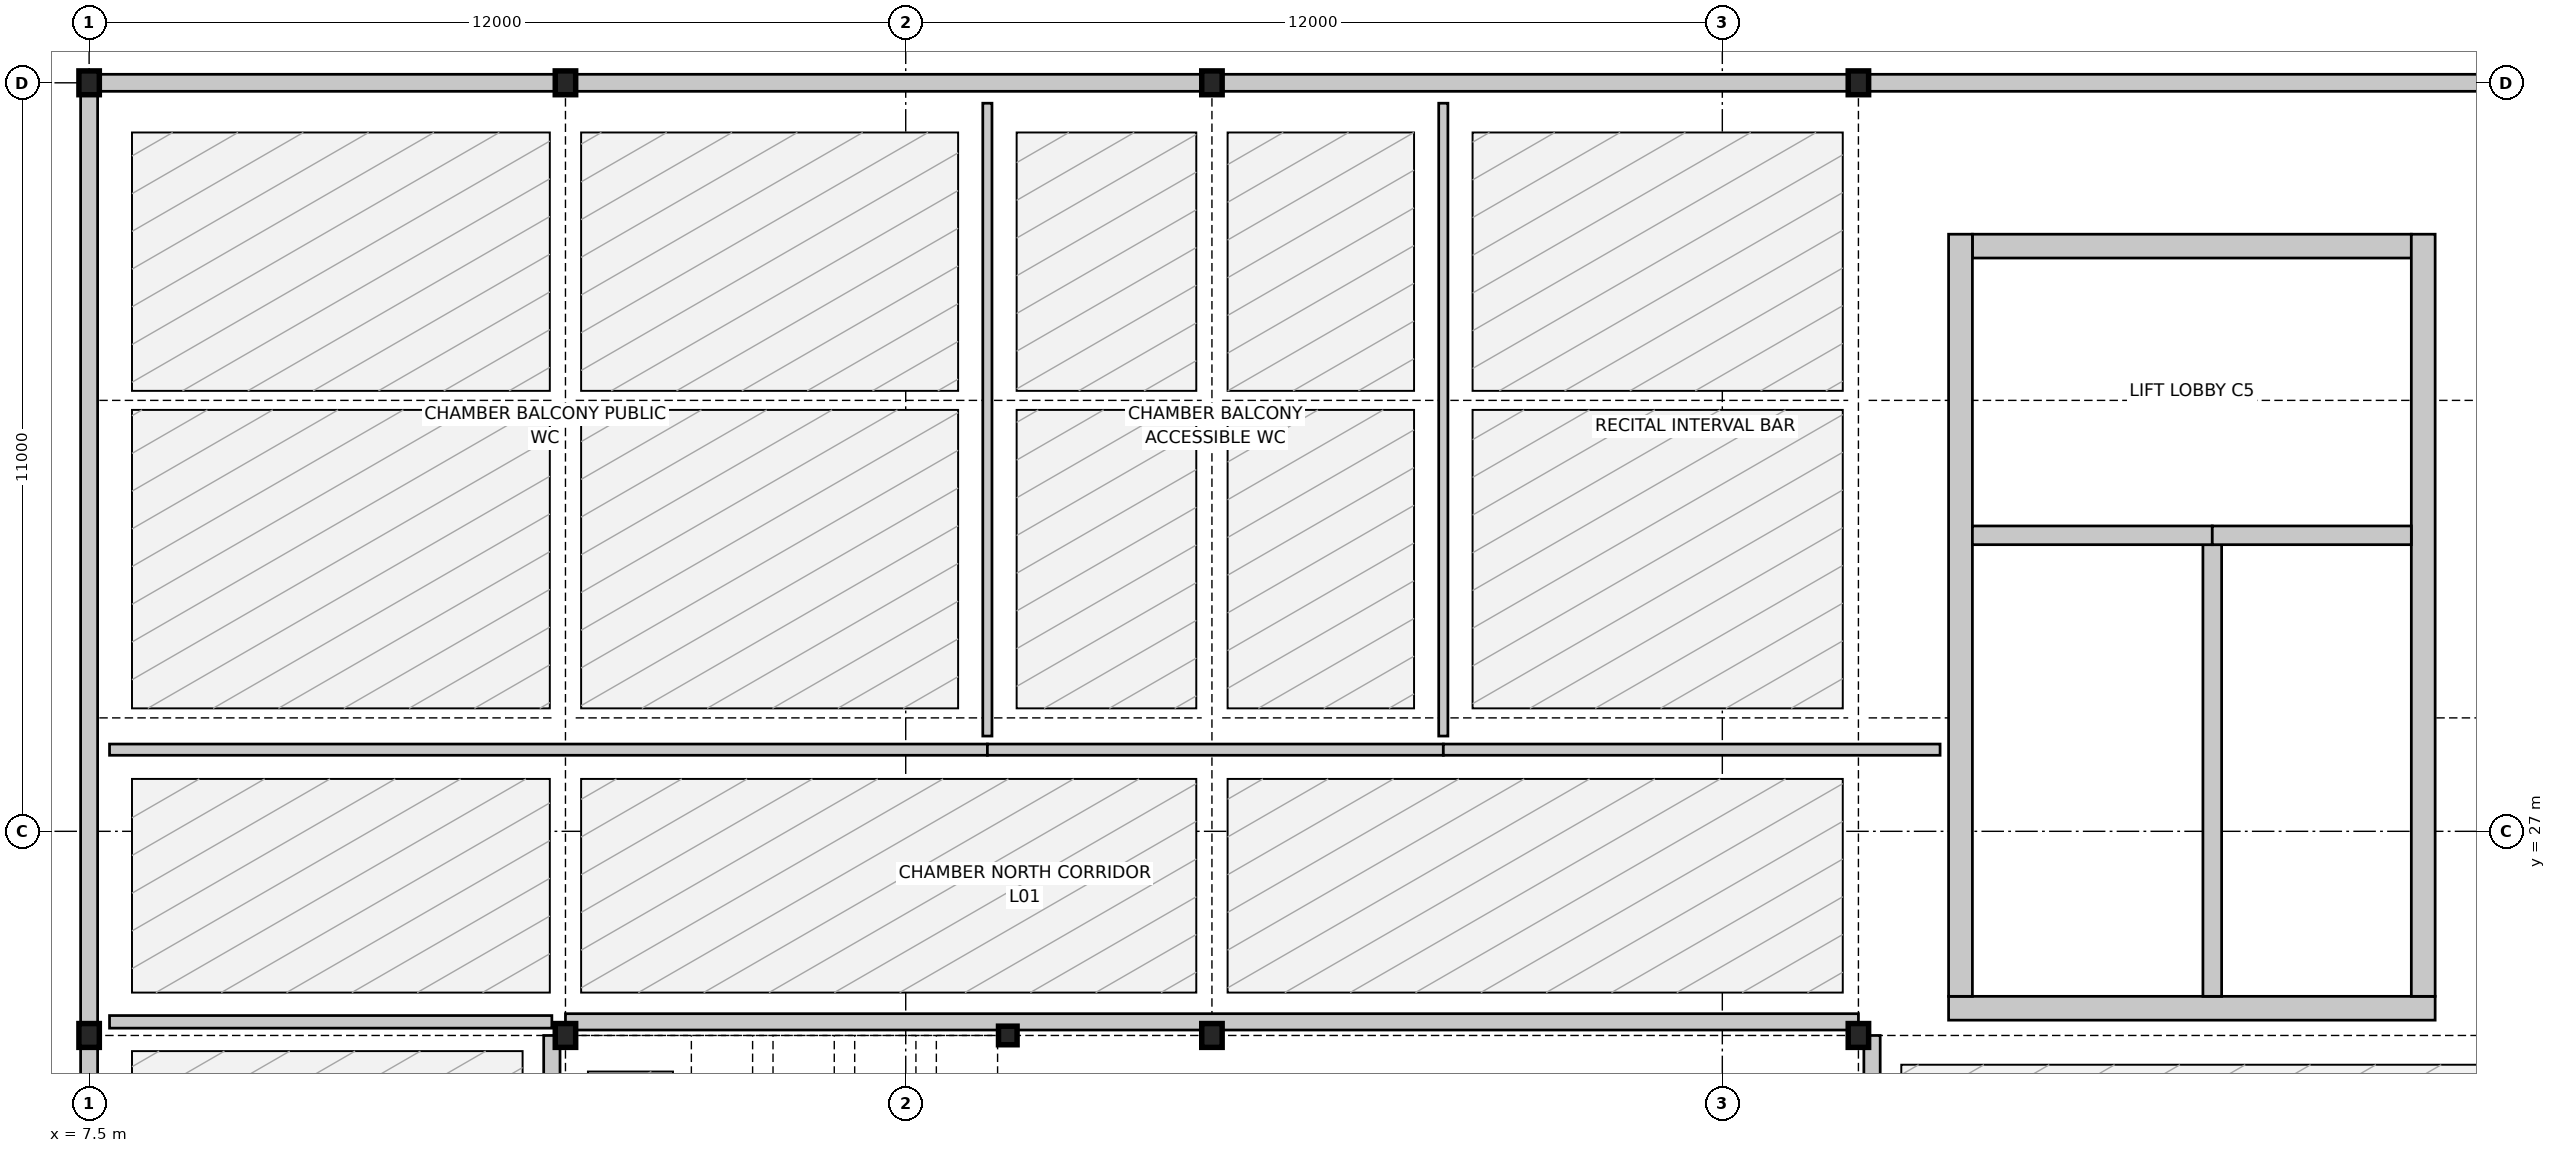
"""IFC4 building model, lengths in metres.
Left out: names, types, materials, properties, quantities, classifications, styles, units other than length and angle.
Written with IfcOpenShell. Run it as: python <this file> out.ifc"""

import sys

from ifc_helpers import new_model, si_unit, direction, frame, frame_2d, origin, origin_2d, place, context, subcontext, project, spatial, rectangle, hollow_circle, i_section, extrude, element, fill, save


model = new_model("IFC4")
c1 = context("Model", 3, precision=1e-05, world=origin(), true_north=direction((0.0, 1.0)))
c2 = subcontext(c1, "Body", "Model", "MODEL_VIEW")
j1 = project(units=[si_unit("LENGTHUNIT", "METRE"), si_unit("PLANEANGLEUNIT", "RADIAN")], contexts=[c1])
p1 = place(None, origin())
s1 = spatial("IfcSite", under=j1, at=p1, CompositionType="ELEMENT")
p2 = place(p1, origin())
s2 = spatial("IfcBuilding", under=s1, at=p2, CompositionType="ELEMENT")
p3 = place(p2, frame((0.0, 0.0, 4.8)))
s3 = spatial("IfcBuildingStorey", under=s2, at=p3, CompositionType="ELEMENT", Elevation=4.8)
for number, where, z_axis, x_axis in (
    (1, (33.5, 38.0, 0.0), (0.0, 0.0, 1.0), (1.0, 0.0, 0.0)),
    (2, (24.0, 38.0, 0.0), (0.0, 0.0, 1.0), (1.0, 0.0, 0.0)),
    (3, (14.5, 38.0, 0.0), (0.0, 0.0, 1.0), (1.0, 0.0, 0.0)),
    (4, (7.5, 38.0, 0.0), (0.0, 0.0, 1.0), (1.0, 0.0, 0.0)),
    (5, (7.5, 24.0, 0.0), (0.0, 0.0, 1.0), (1.0, 0.0, 0.0)),
    (6, (14.5, 24.0, 0.0), (0.0, 0.0, 1.0), (1.0, 0.0, 0.0)),
    (7, (24.0, 24.0, 0.0), (0.0, 0.0, 1.0), (1.0, 0.0, 0.0)),
    (8, (33.5, 24.0, 0.0), (0.0, 0.0, 1.0), (1.0, 0.0, 0.0)),
):
    element("IfcColumn", number, at=place(p3, frame(where, z_axis=z_axis, x_axis=x_axis)), inside=s3, PredefinedType="COLUMN", context=c2, shape_type="SweptSolid", body=[
        extrude(i_section(OverallWidth=0.3, OverallDepth=0.35, WebThickness=0.01, FlangeThickness=0.018, FilletRadius=0.027, at=origin_2d()), origin(), (0.0, 0.0, 1.0), 4.8),
    ])
p4 = place(p3, frame((21.0, 24.0, 0.0), z_axis=(0.0, 0.0, 1.0), x_axis=(1.0, 0.0, 0.0)))
e9 = element("IfcColumn", 9, at=p4, inside=s3, PredefinedType="COLUMN", context=c2, shape_type="SweptSolid", body=[
    extrude(hollow_circle(Radius=0.136, WallThickness=0.016, at=origin_2d()), origin(), (0.0, 0.0, 1.0), 0.96),
])
p5 = place(p3, frame((33.52, 38.0, 0.0), z_axis=(0.0, 0.0, 1.0), x_axis=(1.0, 0.0, 0.0)))
e10 = element("IfcWall", 10, at=p5, inside=s3, PredefinedType="SOLIDWALL", context=c2, shape_type="SweptSolid", body=[
    extrude(rectangle(XDim=10.96, YDim=0.25, at=frame_2d((5.48, 0.0))), origin(), (0.0, 0.0, 1.0), 4.078),
])
p6 = place(p3, frame((24.02, 38.0, 0.0), z_axis=(0.0, 0.0, 1.0), x_axis=(1.0, 0.0, 0.0)))
e11 = element("IfcWall", 11, at=p6, inside=s3, PredefinedType="SOLIDWALL", context=c2, shape_type="SweptSolid", body=[
    extrude(rectangle(XDim=9.46, YDim=0.25, at=frame_2d((4.73, 0.0))), origin(), (0.0, 0.0, 1.0), 4.078),
])
p7 = place(p3, frame((14.52, 38.0, 0.0), z_axis=(0.0, 0.0, 1.0), x_axis=(1.0, 0.0, 0.0)))
e12 = element("IfcWall", 12, at=p7, inside=s3, PredefinedType="SOLIDWALL", context=c2, shape_type="SweptSolid", body=[
    extrude(rectangle(XDim=9.46, YDim=0.25, at=frame_2d((4.73, 0.0))), origin(), (0.0, 0.0, 1.0), 4.078),
])
p8 = place(p7, frame((3.38, 0.0, 0.85)))
e13 = element("IfcOpeningElement", 13, at=p8, cuts=e12, PredefinedType="OPENING", context=c2, shape_type="SweptSolid", body=[
    extrude(rectangle(XDim=2.7, YDim=1.7, at=frame_2d((1.35, 0.85))), frame((0.0, 0.135, 0.0), z_axis=(0.0, -1.0, 0.0), x_axis=(1.0, 0.0, 0.0)), (0.0, 0.0, 1.0), 0.27),
])
p9 = place(p3, frame((7.52, 38.0, 0.0), z_axis=(0.0, 0.0, 1.0), x_axis=(1.0, 0.0, 0.0)))
e14 = element("IfcWall", 14, at=p9, inside=s3, PredefinedType="SOLIDWALL", context=c2, shape_type="SweptSolid", body=[
    extrude(rectangle(XDim=6.96, YDim=0.25, at=frame_2d((3.48, 0.0))), origin(), (0.0, 0.0, 1.0), 4.078),
])
p10 = place(p3, frame((7.5, 24.02, 0.0), z_axis=(0.0, 0.0, 1.0), x_axis=(0.0, 1.0, 0.0)))
e15 = element("IfcWall", 15, at=p10, inside=s3, PredefinedType="SOLIDWALL", context=c2, shape_type="SweptSolid", body=[
    extrude(rectangle(XDim=13.96, YDim=0.25, at=frame_2d((6.98, 0.0))), origin(), (0.0, 0.0, 1.0), 4.078),
])
p11 = place(p3, frame((7.5, 11.52, 0.0), z_axis=(0.0, 0.0, 1.0), x_axis=(0.0, 1.0, 0.0)))
e16 = element("IfcWall", 16, at=p11, inside=s3, PredefinedType="SOLIDWALL", context=c2, shape_type="SweptSolid", body=[
    extrude(rectangle(XDim=12.46, YDim=0.25, at=frame_2d((6.23, 0.0))), origin(), (0.0, 0.0, 1.0), 4.078),
])
p12 = place(p11, frame((4.88, 0.0, 0.85)))
e17 = element("IfcOpeningElement", 17, at=p12, cuts=e16, PredefinedType="OPENING", context=c2, shape_type="SweptSolid", body=[
    extrude(rectangle(XDim=2.7, YDim=1.7, at=frame_2d((1.35, 0.85))), frame((0.0, 0.135, 0.0), z_axis=(0.0, -1.0, 0.0), x_axis=(1.0, 0.0, 0.0)), (0.0, 0.0, 1.0), 0.27),
])
p13 = place(p3, frame((34.825, 24.4, 0.0), z_axis=(0.0, 0.0, 1.0), x_axis=(1.0, 0.0, 0.0)))
e18 = element("IfcWall", 18, at=p13, inside=s3, PredefinedType="SHEAR", context=c2, shape_type="SweptSolid", body=[
    extrude(rectangle(XDim=7.15, YDim=0.35, at=frame_2d((3.575, 0.0))), origin(), (0.0, 0.0, 1.0), 4.54),
])
p14 = place(p3, frame((35.175, 35.6, 0.0), z_axis=(0.0, 0.0, 1.0), x_axis=(1.0, 0.0, 0.0)))
e19 = element("IfcWall", 19, at=p14, inside=s3, PredefinedType="SHEAR", context=c2, shape_type="SweptSolid", body=[
    extrude(rectangle(XDim=6.45, YDim=0.35, at=frame_2d((3.225, 0.0))), origin(), (0.0, 0.0, 1.0), 4.54),
])
p15 = place(p14, frame((2.5, 0.0, 0.0)))
e20 = element("IfcOpeningElement", 20, at=p15, cuts=e19, PredefinedType="OPENING", context=c2, shape_type="SweptSolid", body=[
    extrude(rectangle(XDim=1.45, YDim=2.2, at=frame_2d((0.725, 1.1))), frame((0.0, 0.185, 0.0), z_axis=(0.0, -1.0, 0.0), x_axis=(1.0, 0.0, 0.0)), (0.0, 0.0, 1.0), 0.37),
])
for number, where, z_axis, x_axis in (
    (21, (35.0, 24.575, 0.0), (0.0, 0.0, 1.0), (0.0, 1.0, 0.0)),
    (22, (41.8, 24.575, 0.0), (0.0, 0.0, 1.0), (0.0, 1.0, 0.0)),
):
    element("IfcWall", number, at=place(p3, frame(where, z_axis=z_axis, x_axis=x_axis)), inside=s3, PredefinedType="SHEAR", context=c2, shape_type="SweptSolid", body=[
        extrude(rectangle(XDim=11.2, YDim=0.35, at=frame_2d((5.6, 0.0))), origin(), (0.0, 0.0, 1.0), 4.54),
    ])
p16 = place(p3, frame((38.7, 24.575, 0.0), z_axis=(0.0, 0.0, 1.0), x_axis=(0.0, 1.0, 0.0)))
e23 = element("IfcWall", 23, at=p16, inside=s3, PredefinedType="SHEAR", context=c2, shape_type="SweptSolid", body=[
    extrude(rectangle(XDim=6.637, YDim=0.275, at=frame_2d((3.319, 0.0))), origin(), (0.0, 0.0, 1.0), 4.54),
])
p17 = place(p3, frame((35.175, 31.35, 0.0), z_axis=(0.0, 0.0, 1.0), x_axis=(1.0, 0.0, 0.0)))
e24 = element("IfcWall", 24, at=p17, inside=s3, PredefinedType="SHEAR", context=c2, shape_type="SweptSolid", body=[
    extrude(rectangle(XDim=3.525, YDim=0.275, at=frame_2d((1.762, 0.0))), origin(), (0.0, 0.0, 1.0), 4.54),
])
p18 = place(p17, frame((1.835, 0.0, 0.0)))
e25 = element("IfcOpeningElement", 25, at=p18, cuts=e24, PredefinedType="OPENING", context=c2, shape_type="SweptSolid", body=[
    extrude(rectangle(XDim=1.2, YDim=2.15, at=frame_2d((0.6, 1.075))), frame((0.0, 0.147, 0.0), z_axis=(0.0, -1.0, 0.0), x_axis=(1.0, 0.0, 0.0)), (0.0, 0.0, 1.0), 0.295),
])
p19 = place(p3, frame((38.7, 31.35, 0.0), z_axis=(0.0, 0.0, 1.0), x_axis=(1.0, 0.0, 0.0)))
e26 = element("IfcWall", 26, at=p19, inside=s3, PredefinedType="SHEAR", context=c2, shape_type="SweptSolid", body=[
    extrude(rectangle(XDim=2.925, YDim=0.275, at=frame_2d((1.462, 0.0))), origin(), (0.0, 0.0, 1.0), 4.54),
])
p20 = place(p19, frame((0.982, 0.0, 0.0)))
e27 = element("IfcOpeningElement", 27, at=p20, cuts=e26, PredefinedType="OPENING", context=c2, shape_type="SweptSolid", body=[
    extrude(rectangle(XDim=1.1, YDim=2.15, at=frame_2d((0.55, 1.075))), frame((0.0, 0.147, 0.0), z_axis=(0.0, -1.0, 0.0), x_axis=(1.0, 0.0, 0.0)), (0.0, 0.0, 1.0), 0.295),
])
p21 = place(p3, frame((14.3, 11.5, 0.0), z_axis=(0.0, 0.0, 1.0), x_axis=(0.0, 1.0, 0.0)))
e28 = element("IfcWall", 28, at=p21, inside=s3, PredefinedType="PARTITIONING", context=c2, shape_type="SweptSolid", body=[
    extrude(rectangle(XDim=12.5, YDim=0.24, at=frame_2d((6.25, 0.0))), origin(), (0.0, 0.0, 1.0), 4.08),
])
p22 = place(p21, frame((5.425, 0.0, 0.0)))
e29 = element("IfcOpeningElement", 29, at=p22, cuts=e28, PredefinedType="OPENING", context=c2, shape_type="SweptSolid", body=[
    extrude(rectangle(XDim=1.65, YDim=2.2, at=frame_2d((0.825, 1.1))), frame((0.0, 0.13, 0.0), z_axis=(0.0, -1.0, 0.0), x_axis=(1.0, 0.0, 0.0)), (0.0, 0.0, 1.0), 0.26),
])
p23 = place(p3, frame((33.7, 11.5, 0.0), z_axis=(0.0, 0.0, 1.0), x_axis=(0.0, 1.0, 0.0)))
e30 = element("IfcWall", 30, at=p23, inside=s3, PredefinedType="PARTITIONING", context=c2, shape_type="SweptSolid", body=[
    extrude(rectangle(XDim=12.5, YDim=0.24, at=frame_2d((6.25, 0.0))), origin(), (0.0, 0.0, 1.0), 4.08),
])
p24 = place(p3, frame((7.8, 24.2, 0.0), z_axis=(0.0, 0.0, 1.0), x_axis=(1.0, 0.0, 0.0)))
e31 = element("IfcWall", 31, at=p24, inside=s3, PredefinedType="PARTITIONING", context=c2, shape_type="SweptSolid", body=[
    extrude(rectangle(XDim=6.5, YDim=0.185, at=frame_2d((3.25, 0.0))), origin(), (0.0, 0.0, 1.0), 4.08),
])
p25 = place(p24, frame((2.7, 0.0, 0.0)))
e32 = element("IfcOpeningElement", 32, at=p25, cuts=e31, PredefinedType="OPENING", context=c2, shape_type="SweptSolid", body=[
    extrude(rectangle(XDim=1.1, YDim=2.15, at=frame_2d((0.55, 1.075))), frame((0.0, 0.103, 0.0), z_axis=(0.0, -1.0, 0.0), x_axis=(1.0, 0.0, 0.0)), (0.0, 0.0, 1.0), 0.205),
])
p26 = place(p3, frame((14.5, 24.2, 0.0), z_axis=(0.0, 0.0, 1.0), x_axis=(1.0, 0.0, 0.0)))
e33 = element("IfcWall", 33, at=p26, inside=s3, PredefinedType="PARTITIONING", context=c2, shape_type="SweptSolid", body=[
    extrude(rectangle(XDim=19.0, YDim=0.24, at=frame_2d((9.5, 0.0))), origin(), (0.0, 0.0, 1.0), 4.08),
])
p27 = place(p3, frame((7.8, 28.2, 0.0), z_axis=(0.0, 0.0, 1.0), x_axis=(1.0, 0.0, 0.0)))
e34 = element("IfcWall", 34, at=p27, inside=s3, PredefinedType="PARTITIONING", context=c2, shape_type="SweptSolid", body=[
    extrude(rectangle(XDim=12.9, YDim=0.165, at=frame_2d((6.45, 0.0))), origin(), (0.0, 0.0, 1.0), 4.08),
])
p28 = place(p27, frame((5.99, 0.0, 0.0)))
e35 = element("IfcOpeningElement", 35, at=p28, cuts=e34, PredefinedType="OPENING", context=c2, shape_type="SweptSolid", body=[
    extrude(rectangle(XDim=0.92, YDim=2.1, at=frame_2d((0.46, 1.05))), frame((0.0, 0.093, 0.0), z_axis=(0.0, -1.0, 0.0), x_axis=(1.0, 0.0, 0.0)), (0.0, 0.0, 1.0), 0.185),
])
p29 = place(p3, frame((20.7, 28.2, 0.0), z_axis=(0.0, 0.0, 1.0), x_axis=(1.0, 0.0, 0.0)))
e36 = element("IfcWall", 36, at=p29, inside=s3, PredefinedType="PARTITIONING", context=c2, shape_type="SweptSolid", body=[
    extrude(rectangle(XDim=6.7, YDim=0.165, at=frame_2d((3.35, 0.0))), origin(), (0.0, 0.0, 1.0), 4.08),
])
p30 = place(p29, frame((2.91, 0.0, 0.0)))
e37 = element("IfcOpeningElement", 37, at=p30, cuts=e36, PredefinedType="OPENING", context=c2, shape_type="SweptSolid", body=[
    extrude(rectangle(XDim=0.88, YDim=2.1, at=frame_2d((0.44, 1.05))), frame((0.0, 0.093, 0.0), z_axis=(0.0, -1.0, 0.0), x_axis=(1.0, 0.0, 0.0)), (0.0, 0.0, 1.0), 0.185),
])
p31 = place(p3, frame((27.4, 28.2, 0.0), z_axis=(0.0, 0.0, 1.0), x_axis=(1.0, 0.0, 0.0)))
e38 = element("IfcWall", 38, at=p31, inside=s3, PredefinedType="PARTITIONING", context=c2, shape_type="SweptSolid", body=[
    extrude(rectangle(XDim=7.3, YDim=0.165, at=frame_2d((3.65, 0.0))), origin(), (0.0, 0.0, 1.0), 4.08),
])
p32 = place(p31, frame((3.125, 0.0, 0.0)))
e39 = element("IfcOpeningElement", 39, at=p32, cuts=e38, PredefinedType="OPENING", context=c2, shape_type="SweptSolid", body=[
    extrude(rectangle(XDim=1.05, YDim=2.15, at=frame_2d((0.525, 1.075))), frame((0.0, 0.093, 0.0), z_axis=(0.0, -1.0, 0.0), x_axis=(1.0, 0.0, 0.0)), (0.0, 0.0, 1.0), 0.185),
])
for number, where, z_axis, x_axis in (
    (40, (20.7, 28.4, 0.0), (0.0, 0.0, 1.0), (0.0, 1.0, 0.0)),
    (41, (27.4, 28.4, 0.0), (0.0, 0.0, 1.0), (0.0, 1.0, 0.0)),
):
    element("IfcWall", number, at=place(p3, frame(where, z_axis=z_axis, x_axis=x_axis)), inside=s3, PredefinedType="PARTITIONING", context=c2, shape_type="SweptSolid", body=[
        extrude(rectangle(XDim=9.3, YDim=0.135, at=frame_2d((4.65, 0.0))), origin(), (0.0, 0.0, 1.0), 4.29),
    ])
p33 = place(p8, origin())
e42 = element("IfcWindow", 42, at=p33, inside=s3, PartitioningType="SINGLE_PANEL", PredefinedType="WINDOW", context=c2, shape_type="SweptSolid", body=[
    extrude(rectangle(XDim=2.7, YDim=1.7, at=frame_2d((1.35, 0.85))), frame((0.0, 0.03, 0.0), z_axis=(0.0, -1.0, 0.0), x_axis=(1.0, 0.0, 0.0)), (0.0, 0.0, 1.0), 0.06),
])
fill(e13, e42)
p34 = place(p18, origin())
e43 = element("IfcDoor", 43, at=p34, inside=s3, OperationType="SINGLE_SWING_RIGHT", PredefinedType="DOOR", context=c2, shape_type="SweptSolid", body=[
    extrude(rectangle(XDim=1.2, YDim=2.15, at=frame_2d((0.6, 1.075))), frame((0.0, 0.025, 0.0), z_axis=(0.0, -1.0, 0.0), x_axis=(1.0, 0.0, 0.0)), (0.0, 0.0, 1.0), 0.05),
])
fill(e25, e43)
p35 = place(p20, origin())
e44 = element("IfcDoor", 44, at=p35, inside=s3, OperationType="DOUBLE_DOOR_SLIDING", PredefinedType="DOOR", context=c2, shape_type="SweptSolid", body=[
    extrude(rectangle(XDim=1.1, YDim=2.15, at=frame_2d((0.55, 1.075))), frame((0.0, 0.025, 0.0), z_axis=(0.0, -1.0, 0.0), x_axis=(1.0, 0.0, 0.0)), (0.0, 0.0, 1.0), 0.05),
])
fill(e27, e44)
p36 = place(p15, origin())
e45 = element("IfcDoor", 45, at=p36, inside=s3, OperationType="SINGLE_SWING_RIGHT", PredefinedType="DOOR", context=c2, shape_type="SweptSolid", body=[
    extrude(rectangle(XDim=1.45, YDim=2.2, at=frame_2d((0.725, 1.1))), frame((0.0, 0.025, 0.0), z_axis=(0.0, -1.0, 0.0), x_axis=(1.0, 0.0, 0.0)), (0.0, 0.0, 1.0), 0.05),
])
fill(e20, e45)
p37 = place(p25, origin())
e46 = element("IfcDoor", 46, at=p37, inside=s3, OperationType="SINGLE_SWING_RIGHT", PredefinedType="DOOR", context=c2, shape_type="SweptSolid", body=[
    extrude(rectangle(XDim=1.1, YDim=2.15, at=frame_2d((0.55, 1.075))), frame((0.0, 0.025, 0.0), z_axis=(0.0, -1.0, 0.0), x_axis=(1.0, 0.0, 0.0)), (0.0, 0.0, 1.0), 0.05),
])
fill(e32, e46)
p38 = place(p28, origin())
e47 = element("IfcDoor", 47, at=p38, inside=s3, OperationType="SINGLE_SWING_LEFT", PredefinedType="DOOR", context=c2, shape_type="SweptSolid", body=[
    extrude(rectangle(XDim=0.92, YDim=2.1, at=frame_2d((0.46, 1.05))), frame((0.0, 0.025, 0.0), z_axis=(0.0, -1.0, 0.0), x_axis=(1.0, 0.0, 0.0)), (0.0, 0.0, 1.0), 0.05),
])
fill(e35, e47)
p39 = place(p30, origin())
e48 = element("IfcDoor", 48, at=p39, inside=s3, OperationType="SINGLE_SWING_RIGHT", PredefinedType="DOOR", context=c2, shape_type="SweptSolid", body=[
    extrude(rectangle(XDim=0.88, YDim=2.1, at=frame_2d((0.44, 1.05))), frame((0.0, 0.025, 0.0), z_axis=(0.0, -1.0, 0.0), x_axis=(1.0, 0.0, 0.0)), (0.0, 0.0, 1.0), 0.05),
])
fill(e37, e48)
p40 = place(p32, origin())
e49 = element("IfcDoor", 49, at=p40, inside=s3, OperationType="SINGLE_SWING_LEFT", PredefinedType="DOOR", context=c2, shape_type="SweptSolid", body=[
    extrude(rectangle(XDim=1.05, YDim=2.15, at=frame_2d((0.525, 1.075))), frame((0.0, 0.025, 0.0), z_axis=(0.0, -1.0, 0.0), x_axis=(1.0, 0.0, 0.0)), (0.0, 0.0, 1.0), 0.05),
])
fill(e39, e49)
save(model, sys.argv[1])
